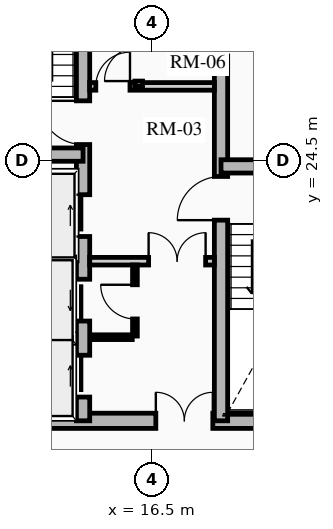
"""IFC4 building model, lengths in metres.
Left out: names, types, materials, properties, quantities, classifications, styles, units other than length and angle.
Written with IfcOpenShell. Run it as: python <this file> out.ifc"""

import sys

from ifc_helpers import new_model, si_unit, direction, frame, frame_2d, origin, place, context, subcontext, project, spatial, rectangle, extrude, source, transform, mapped, element, fill, save


model = new_model("IFC4")
c1 = context("Model", 3, precision=1e-05, world=origin(), true_north=direction((0.0, 1.0)))
c2 = subcontext(c1, "Body", "Model", "MODEL_VIEW")
j1 = project(units=[si_unit("LENGTHUNIT", "METRE"), si_unit("PLANEANGLEUNIT", "RADIAN")], contexts=[c1])
p1 = place(None, origin())
s1 = spatial("IfcSite", under=j1, at=p1, CompositionType="ELEMENT")
p2 = place(p1, origin())
s2 = spatial("IfcBuilding", under=s1, at=p2, CompositionType="ELEMENT")
p3 = place(p2, frame((0.0, 0.0, 211.21)))
s3 = spatial("IfcBuildingStorey", under=s2, at=p3, CompositionType="ELEMENT", Elevation=211.21)
p4 = place(p3, frame((11.15, 17.65, 0.0), z_axis=(0.0, 0.0, 1.0), x_axis=(1.0, 0.0, 0.0)))
e1 = element("IfcWall", 1, at=p4, inside=s3, PredefinedType="SHEAR", context=c2, shape_type="SweptSolid", body=[
    extrude(rectangle(XDim=10.7, YDim=0.4, at=frame_2d((5.35, 0.0))), origin(), (0.0, 0.0, 1.0), 2.91),
])
m1 = source(origin(), c2, "Body", "SweptSolid", [
    extrude(rectangle(XDim=1.5, YDim=2.02, at=frame_2d((0.75, 1.01))), frame((0.0, 0.21, 0.0), z_axis=(0.0, -1.0, 0.0), x_axis=(1.0, 0.0, 0.0)), (0.0, 0.0, 1.0), 0.42),
])
p5 = place(p4, frame((5.45, 0.0, 0.0)))
e2 = element("IfcOpeningElement", 2, at=p5, cuts=e1, PredefinedType="OPENING", context=c2, shape_type="MappedRepresentation", body=[
    mapped(m1, transform((0.0, 0.0, 0.0), x_axis=(1.0, 0.0, 0.0), y_axis=(0.0, 1.0, 0.0), z_axis=(0.0, 0.0, 1.0), scale=1.0)),
])
p6 = place(p3, frame((14.685, 17.65, 0.0), z_axis=(0.0, 0.0, 1.0), x_axis=(0.0, 1.0, 0.0)))
e3 = element("IfcWall", 3, at=p6, inside=s3, PredefinedType="SHEAR", context=c2, shape_type="SweptSolid", body=[
    extrude(rectangle(XDim=13.7, YDim=0.35, at=frame_2d((6.85, 0.0))), origin(), (0.0, 0.0, 1.0), 2.91),
])
m2 = source(origin(), c2, "Body", "SweptSolid", [
    extrude(rectangle(XDim=1.1, YDim=2.015, at=frame_2d((0.55, 1.007))), frame((0.0, 0.185, 0.0), z_axis=(0.0, -1.0, 0.0), x_axis=(1.0, 0.0, 0.0)), (0.0, 0.0, 1.0), 0.37),
])
p7 = place(p6, frame((4.85, 0.0, 0.0)))
e4 = element("IfcOpeningElement", 4, at=p7, cuts=e3, PredefinedType="OPENING", context=c2, shape_type="MappedRepresentation", body=[
    mapped(m2, transform((0.0, 0.0, 0.0), x_axis=(1.0, 0.0, 0.0), y_axis=(0.0, 1.0, 0.0), z_axis=(0.0, 0.0, 1.0), scale=1.0)),
])
p8 = place(p6, frame((0.625, 0.0, 0.0)))
e5 = element("IfcOpeningElement", 5, at=p8, cuts=e3, PredefinedType="OPENING", context=c2, shape_type="MappedRepresentation", body=[
    mapped(m2, transform((0.0, 0.0, 0.0), x_axis=(1.0, 0.0, 0.0), y_axis=(0.0, 1.0, 0.0), z_axis=(0.0, 0.0, 1.0), scale=1.0)),
])
p9 = place(p6, frame((2.625, 0.0, 0.0)))
e6 = element("IfcOpeningElement", 6, at=p9, cuts=e3, PredefinedType="OPENING", context=c2, shape_type="MappedRepresentation", body=[
    mapped(m2, transform((0.0, 0.0, 0.0), x_axis=(1.0, 0.0, 0.0), y_axis=(0.0, 1.0, 0.0), z_axis=(0.0, 0.0, 1.0), scale=1.0)),
])
m3 = source(origin(), c2, "Body", "SweptSolid", [
    extrude(rectangle(XDim=1.15, YDim=2.02, at=frame_2d((0.575, 1.01))), frame((0.0, 0.185, 0.0), z_axis=(0.0, -1.0, 0.0), x_axis=(1.0, 0.0, 0.0)), (0.0, 0.0, 1.0), 0.37),
])
p10 = place(p6, frame((7.27, 0.0, 0.0)))
e7 = element("IfcOpeningElement", 7, at=p10, cuts=e3, PredefinedType="OPENING", context=c2, shape_type="MappedRepresentation", body=[
    mapped(m3, transform((0.0, 0.0, 0.0), x_axis=(1.0, 0.0, 0.0), y_axis=(0.0, 1.0, 0.0), z_axis=(0.0, 0.0, 1.0), scale=1.0)),
])
p11 = place(p3, frame((18.315, 17.65, 0.0), z_axis=(0.0, 0.0, 1.0), x_axis=(0.0, 1.0, 0.0)))
e8 = element("IfcWall", 8, at=p11, inside=s3, PredefinedType="SHEAR", context=c2, shape_type="SweptSolid", body=[
    extrude(rectangle(XDim=9.6, YDim=0.35, at=frame_2d((4.8, 0.0))), origin(), (0.0, 0.0, 1.0), 2.91),
])
p12 = place(p11, frame((5.28, 0.0, 0.0)))
e9 = element("IfcOpeningElement", 9, at=p12, cuts=e8, PredefinedType="OPENING", context=c2, shape_type="MappedRepresentation", body=[
    mapped(m3, transform((0.0, 0.0, 0.0), x_axis=(1.0, 0.0, 0.0), y_axis=(0.0, 1.0, 0.0), z_axis=(0.0, 0.0, 1.0), scale=1.0)),
])
for number, where, z_axis, x_axis in (
    (10, (11.4, 24.655, 0.0), (0.0, 0.0, 1.0), (1.0, 0.0, 0.0)),
    (11, (18.315, 24.345, 0.0), (0.0, 0.0, 1.0), (1.0, 0.0, 0.0)),
):
    element("IfcWall", number, at=place(p3, frame(where, z_axis=z_axis, x_axis=x_axis)), inside=s3, PredefinedType="SHEAR", context=c2, shape_type="SweptSolid", body=[
        extrude(rectangle(XDim=3.285, YDim=0.35, at=frame_2d((1.643, 0.0))), origin(), (0.0, 0.0, 1.0), 2.91),
    ])
for number, where, z_axis, x_axis in (
    (12, (11.52, 21.8, 0.0), (0.0, 0.0, 1.0), (1.0, 0.0, 0.0)),
    (13, (11.52, 19.825, 0.0), (0.0, 0.0, 1.0), (1.0, 0.0, 0.0)),
):
    element("IfcWall", number, at=place(p3, frame(where, z_axis=z_axis, x_axis=x_axis)), inside=s3, PredefinedType="SHEAR", context=c2, shape_type="SweptSolid", body=[
        extrude(rectangle(XDim=2.97, YDim=0.2, at=frame_2d((1.485, 0.0))), origin(), (0.0, 0.0, 1.0), 2.91),
    ])
p13 = place(p3, frame((14.86, 21.85, 0.0), z_axis=(0.0, 0.0, 1.0), x_axis=(1.0, 0.0, 0.0)))
e14 = element("IfcWall", 14, at=p13, inside=s3, PredefinedType="PARTITIONING", context=c2, shape_type="SweptSolid", body=[
    extrude(rectangle(XDim=3.28, YDim=0.2, at=frame_2d((1.64, 0.0))), origin(), (0.0, 0.0, 1.0), 2.685),
])
m4 = source(origin(), c2, "Body", "SweptSolid", [
    extrude(rectangle(XDim=1.5, YDim=2.02, at=frame_2d((0.75, 1.01))), frame((0.0, 0.11, 0.0), z_axis=(0.0, -1.0, 0.0), x_axis=(1.0, 0.0, 0.0)), (0.0, 0.0, 1.0), 0.22),
])
p14 = place(p13, frame((1.55, 0.0, 0.0)))
e15 = element("IfcOpeningElement", 15, at=p14, cuts=e14, PredefinedType="OPENING", context=c2, shape_type="MappedRepresentation", body=[
    mapped(m4, transform((0.0, 0.0, 0.0), x_axis=(1.0, 0.0, 0.0), y_axis=(0.0, 1.0, 0.0), z_axis=(0.0, 0.0, 1.0), scale=1.0)),
])
p15 = place(p3, frame((14.86, 26.45, 0.0), z_axis=(0.0, 0.0, 1.0), x_axis=(1.0, 0.0, 0.0)))
e16 = element("IfcWall", 16, at=p15, inside=s3, PredefinedType="PARTITIONING", context=c2, shape_type="SweptSolid", body=[
    extrude(rectangle(XDim=3.28, YDim=0.2, at=frame_2d((1.64, 0.0))), origin(), (0.0, 0.0, 1.0), 2.685),
])
m5 = source(origin(), c2, "Body", "SweptSolid", [
    extrude(rectangle(XDim=0.9, YDim=2.005, at=frame_2d((0.45, 1.002))), frame((0.0, 0.11, 0.0), z_axis=(0.0, -1.0, 0.0), x_axis=(1.0, 0.0, 0.0)), (0.0, 0.0, 1.0), 0.22),
])
p16 = place(p15, frame((0.16, 0.0, 0.0)))
e17 = element("IfcOpeningElement", 17, at=p16, cuts=e16, PredefinedType="OPENING", context=c2, shape_type="MappedRepresentation", body=[
    mapped(m5, transform((0.0, 0.0, 0.0), x_axis=(1.0, 0.0, 0.0), y_axis=(0.0, 1.0, 0.0), z_axis=(0.0, 0.0, 1.0), scale=1.0)),
])
p17 = place(p3, frame((16.15, 26.45, 0.0), z_axis=(0.0, 0.0, 1.0), x_axis=(0.0, 1.0, 0.0)))
e18 = element("IfcWall", 18, at=p17, inside=s3, PredefinedType="PARTITIONING", context=c2, shape_type="SweptSolid", body=[
    extrude(rectangle(XDim=2.4, YDim=0.2, at=frame_2d((1.2, 0.0))), origin(), (0.0, 0.0, 1.0), 2.685),
])
p18 = place(p17, frame((0.14, 0.0, 0.0)))
e19 = element("IfcOpeningElement", 19, at=p18, cuts=e18, PredefinedType="OPENING", context=c2, shape_type="MappedRepresentation", body=[
    mapped(m5, transform((0.0, 0.0, 0.0), x_axis=(1.0, 0.0, 0.0), y_axis=(0.0, 1.0, 0.0), z_axis=(0.0, 0.0, 1.0), scale=1.0)),
])
p19 = place(p3, frame((16.05, 19.88, 0.0), z_axis=(0.0, 0.0, 1.0), x_axis=(0.0, 1.0, 0.0)))
e20 = element("IfcWall", 20, at=p19, inside=s3, PredefinedType="PARTITIONING", context=c2, shape_type="SweptSolid", body=[
    extrude(rectangle(XDim=1.87, YDim=0.125, at=frame_2d((0.935, 0.0))), origin(), (0.0, 0.0, 1.0), 2.685),
])
m6 = source(origin(), c2, "Body", "SweptSolid", [
    extrude(rectangle(XDim=0.9, YDim=2.005, at=frame_2d((0.45, 1.002))), frame((0.0, 0.073, 0.0), z_axis=(0.0, -1.0, 0.0), x_axis=(1.0, 0.0, 0.0)), (0.0, 0.0, 1.0), 0.145),
])
p20 = place(p19, frame((0.45, 0.0, 0.0)))
e21 = element("IfcOpeningElement", 21, at=p20, cuts=e20, PredefinedType="OPENING", context=c2, shape_type="MappedRepresentation", body=[
    mapped(m6, transform((0.0, 0.0, 0.0), x_axis=(1.0, 0.0, 0.0), y_axis=(0.0, 1.0, 0.0), z_axis=(0.0, 0.0, 1.0), scale=1.0)),
])
p21 = place(p3, frame((14.88, 19.85, 0.0), z_axis=(0.0, 0.0, 1.0), x_axis=(1.0, 0.0, 0.0)))
e22 = element("IfcWall", 22, at=p21, inside=s3, PredefinedType="PARTITIONING", context=c2, shape_type="SweptSolid", body=[
    extrude(rectangle(XDim=1.1, YDim=0.125, at=frame_2d((0.55, 0.0))), origin(), (0.0, 0.0, 1.0), 2.685),
])
p22 = place(p3, frame((18.315, 27.25, 0.0), z_axis=(0.0, 0.0, 1.0), x_axis=(0.0, 1.0, 0.0)))
e23 = element("IfcWall", 23, at=p22, inside=s3, PredefinedType="PARTITIONING", context=c2, shape_type="SweptSolid", body=[
    extrude(rectangle(XDim=3.9, YDim=0.16, at=frame_2d((1.95, 0.0))), origin(), (0.0, 0.0, 1.0), 2.685),
])
m7 = source(origin(), c2, "Body", "SweptSolid", [
    extrude(rectangle(XDim=0.9, YDim=2.005, at=frame_2d((0.45, 1.002))), frame((0.0, 0.09, 0.0), z_axis=(0.0, -1.0, 0.0), x_axis=(1.0, 0.0, 0.0)), (0.0, 0.0, 1.0), 0.18),
])
p23 = place(p22, frame((2.2, 0.0, 0.0)))
e24 = element("IfcOpeningElement", 24, at=p23, cuts=e23, PredefinedType="OPENING", context=c2, shape_type="MappedRepresentation", body=[
    mapped(m7, transform((0.0, 0.0, 0.0), x_axis=(1.0, 0.0, 0.0), y_axis=(0.0, 1.0, 0.0), z_axis=(0.0, 0.0, 1.0), scale=1.0)),
])
m8 = source(origin(), c2, "Body", "SweptSolid", [
    extrude(rectangle(XDim=1.1, YDim=2.015, at=frame_2d((0.55, 1.007))), frame((0.0, 0.025, 0.0), z_axis=(0.0, -1.0, 0.0), x_axis=(1.0, 0.0, 0.0)), (0.0, 0.0, 1.0), 0.05),
])
p24 = place(p7, origin())
e25 = element("IfcDoor", 25, at=p24, inside=s3, OperationType="SLIDING_TO_RIGHT", PredefinedType="DOOR", context=c2, shape_type="MappedRepresentation", body=[
    mapped(m8, transform((0.0, 0.0, 0.0), x_axis=(1.0, 0.0, 0.0), y_axis=(0.0, 1.0, 0.0), z_axis=(0.0, 0.0, 1.0), scale=1.0)),
])
fill(e4, e25)
p25 = place(p8, origin())
e26 = element("IfcDoor", 26, at=p25, inside=s3, OperationType="SLIDING_TO_RIGHT", PredefinedType="DOOR", context=c2, shape_type="MappedRepresentation", body=[
    mapped(m8, transform((0.0, 0.0, 0.0), x_axis=(1.0, 0.0, 0.0), y_axis=(0.0, 1.0, 0.0), z_axis=(0.0, 0.0, 1.0), scale=1.0)),
])
fill(e5, e26)
p26 = place(p9, origin())
e27 = element("IfcDoor", 27, at=p26, inside=s3, OperationType="SLIDING_TO_LEFT", PredefinedType="DOOR", context=c2, shape_type="MappedRepresentation", body=[
    mapped(m8, transform((0.0, 0.0, 0.0), x_axis=(1.0, 0.0, 0.0), y_axis=(0.0, 1.0, 0.0), z_axis=(0.0, 0.0, 1.0), scale=1.0)),
])
fill(e6, e27)
m9 = source(origin(), c2, "Body", "SweptSolid", [
    extrude(rectangle(XDim=1.15, YDim=2.02, at=frame_2d((0.575, 1.01))), frame((0.0, 0.025, 0.0), z_axis=(0.0, -1.0, 0.0), x_axis=(1.0, 0.0, 0.0)), (0.0, 0.0, 1.0), 0.05),
])
p27 = place(p10, origin())
e28 = element("IfcDoor", 28, at=p27, inside=s3, OperationType="SINGLE_SWING_RIGHT", PredefinedType="DOOR", context=c2, shape_type="MappedRepresentation", body=[
    mapped(m9, transform((0.0, 0.0, 0.0), x_axis=(1.0, 0.0, 0.0), y_axis=(0.0, 1.0, 0.0), z_axis=(0.0, 0.0, 1.0), scale=1.0)),
])
fill(e7, e28)
p28 = place(p12, origin())
e29 = element("IfcDoor", 29, at=p28, inside=s3, OperationType="SINGLE_SWING_LEFT", PredefinedType="DOOR", context=c2, shape_type="MappedRepresentation", body=[
    mapped(m9, transform((0.0, 0.0, 0.0), x_axis=(1.0, 0.0, 0.0), y_axis=(0.0, 1.0, 0.0), z_axis=(0.0, 0.0, 1.0), scale=1.0)),
])
fill(e9, e29)
m10 = source(origin(), c2, "Body", "SweptSolid", [
    extrude(rectangle(XDim=1.5, YDim=2.02, at=frame_2d((0.75, 1.01))), frame((0.0, 0.025, 0.0), z_axis=(0.0, -1.0, 0.0), x_axis=(1.0, 0.0, 0.0)), (0.0, 0.0, 1.0), 0.05),
])
p29 = place(p5, origin())
e30 = element("IfcDoor", 30, at=p29, inside=s3, OperationType="DOUBLE_DOOR_SINGLE_SWING", PredefinedType="DOOR", context=c2, shape_type="MappedRepresentation", body=[
    mapped(m10, transform((0.0, 0.0, 0.0), x_axis=(1.0, 0.0, 0.0), y_axis=(0.0, 1.0, 0.0), z_axis=(0.0, 0.0, 1.0), scale=1.0)),
])
fill(e2, e30)
p30 = place(p14, origin())
e31 = element("IfcDoor", 31, at=p30, inside=s3, OperationType="DOUBLE_DOOR_SINGLE_SWING", PredefinedType="DOOR", context=c2, shape_type="MappedRepresentation", body=[
    mapped(m10, transform((0.0, 0.0, 0.0), x_axis=(1.0, 0.0, 0.0), y_axis=(0.0, 1.0, 0.0), z_axis=(0.0, 0.0, 1.0), scale=1.0)),
])
fill(e15, e31)
m11 = source(origin(), c2, "Body", "SweptSolid", [
    extrude(rectangle(XDim=0.9, YDim=2.005, at=frame_2d((0.45, 1.002))), frame((0.0, 0.025, 0.0), z_axis=(0.0, -1.0, 0.0), x_axis=(1.0, 0.0, 0.0)), (0.0, 0.0, 1.0), 0.05),
])
p31 = place(p16, origin())
e32 = element("IfcDoor", 32, at=p31, inside=s3, OperationType="SINGLE_SWING_RIGHT", PredefinedType="DOOR", context=c2, shape_type="MappedRepresentation", body=[
    mapped(m11, transform((0.0, 0.0, 0.0), x_axis=(1.0, 0.0, 0.0), y_axis=(0.0, 1.0, 0.0), z_axis=(0.0, 0.0, 1.0), scale=1.0)),
])
fill(e17, e32)
p32 = place(p20, origin())
e33 = element("IfcDoor", 33, at=p32, inside=s3, OperationType="SINGLE_SWING_RIGHT", PredefinedType="DOOR", context=c2, shape_type="MappedRepresentation", body=[
    mapped(m11, transform((0.0, 0.0, 0.0), x_axis=(1.0, 0.0, 0.0), y_axis=(0.0, 1.0, 0.0), z_axis=(0.0, 0.0, 1.0), scale=1.0)),
])
fill(e21, e33)
p33 = place(p18, origin())
e34 = element("IfcDoor", 34, at=p33, inside=s3, OperationType="SINGLE_SWING_LEFT", PredefinedType="DOOR", context=c2, shape_type="MappedRepresentation", body=[
    mapped(m11, transform((0.0, 0.0, 0.0), x_axis=(1.0, 0.0, 0.0), y_axis=(0.0, 1.0, 0.0), z_axis=(0.0, 0.0, 1.0), scale=1.0)),
])
fill(e19, e34)
save(model, sys.argv[1])
